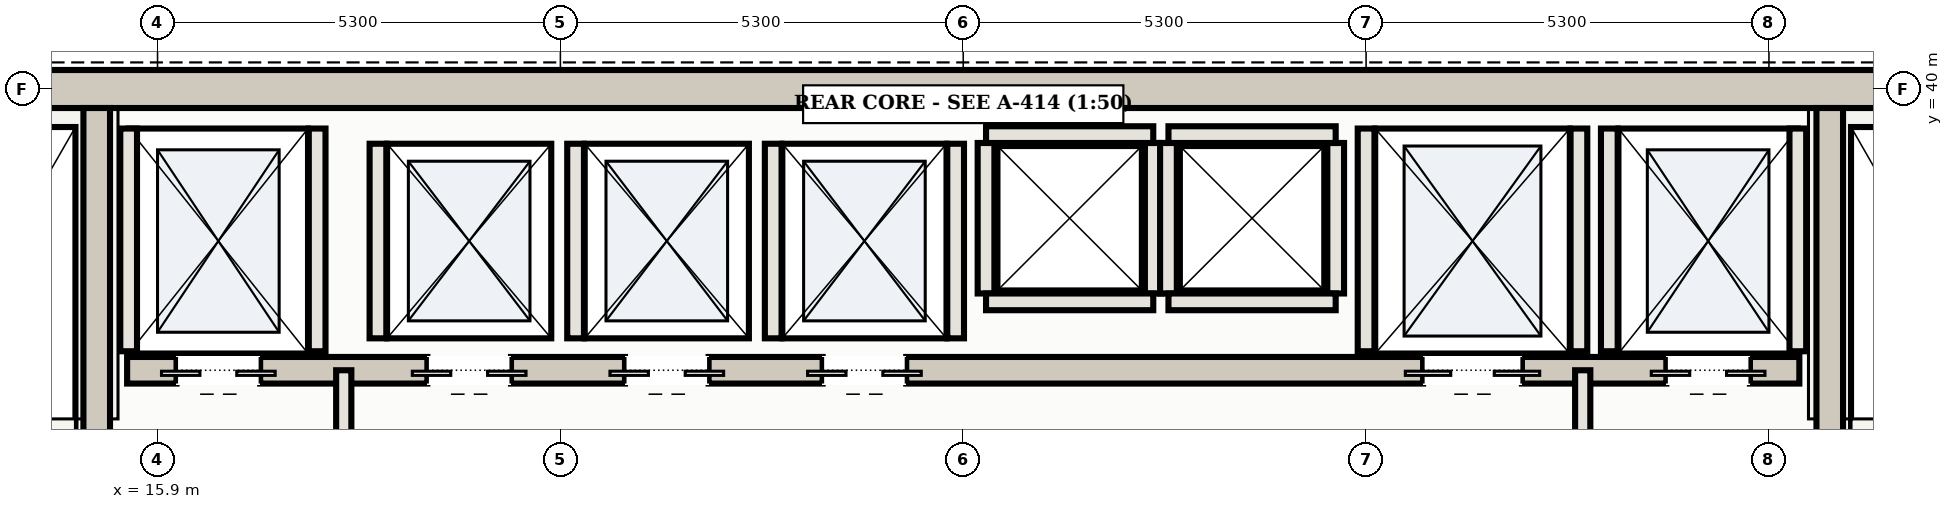
"""IFC4 building model, lengths in metres.
Left out: names, types, materials, properties, quantities, classifications, styles, units other than length and angle.
Written with IfcOpenShell. Run it as: python <this file> out.ifc"""

import sys

from ifc_helpers import new_model, si_unit, direction, frame, frame_2d, origin, place, context, subcontext, project, spatial, rectangle, extrude, element, fill, save


model = new_model("IFC4")
c1 = context("Model", 3, precision=1e-05, world=origin(), true_north=direction((0.0, 1.0)))
c2 = subcontext(c1, "Body", "Model", "MODEL_VIEW")
j1 = project(units=[si_unit("LENGTHUNIT", "METRE"), si_unit("PLANEANGLEUNIT", "RADIAN")], contexts=[c1])
p1 = place(None, origin())
s1 = spatial("IfcSite", under=j1, at=p1, CompositionType="ELEMENT")
p2 = place(p1, origin())
s2 = spatial("IfcBuilding", under=s1, at=p2, CompositionType="ELEMENT")
p3 = place(p2, frame((0.0, 0.0, 233.0)))
s3 = spatial("IfcBuildingStorey", under=s2, at=p3, CompositionType="ELEMENT", Elevation=233.0)
p4 = place(p3, frame((10.35, 40.0, 0.0), z_axis=(0.0, 0.0, 1.0), x_axis=(1.0, 0.0, 0.0)))
e1 = element("IfcWall", 1, at=p4, inside=s3, PredefinedType="SHEAR", context=c2, shape_type="SweptSolid", body=[
    extrude(rectangle(XDim=32.3, YDim=0.5, at=frame_2d((16.15, 0.0))), origin(), (0.0, 0.0, 1.0), 3.11),
])
p5 = place(p3, frame((15.1, 31.1, 0.0), z_axis=(0.0, 0.0, 1.0), x_axis=(0.0, 1.0, 0.0)))
e2 = element("IfcWall", 2, at=p5, inside=s3, PredefinedType="SHEAR", context=c2, shape_type="SweptSolid", body=[
    extrude(rectangle(XDim=8.65, YDim=0.35, at=frame_2d((4.325, 0.0))), origin(), (0.0, 0.0, 1.0), 3.11),
])
p6 = place(p5, frame((0.51, 0.0, 0.0)))
e3 = element("IfcOpeningElement", 3, at=p6, cuts=e2, PredefinedType="OPENING", context=c2, shape_type="SweptSolid", body=[
    extrude(rectangle(XDim=1.15, YDim=2.2, at=frame_2d((0.575, 1.1))), frame((0.0, 0.185, 0.0), z_axis=(0.0, -1.0, 0.0), x_axis=(1.0, 0.0, 0.0)), (0.0, 0.0, 1.0), 0.37),
])
p7 = place(p3, frame((37.9, 31.1, 0.0), z_axis=(0.0, 0.0, 1.0), x_axis=(0.0, 1.0, 0.0)))
e4 = element("IfcWall", 4, at=p7, inside=s3, PredefinedType="SHEAR", context=c2, shape_type="SweptSolid", body=[
    extrude(rectangle(XDim=8.65, YDim=0.35, at=frame_2d((4.325, 0.0))), origin(), (0.0, 0.0, 1.0), 3.11),
])
p8 = place(p7, frame((0.51, 0.0, 0.0)))
e5 = element("IfcOpeningElement", 5, at=p8, cuts=e4, PredefinedType="OPENING", context=c2, shape_type="SweptSolid", body=[
    extrude(rectangle(XDim=1.15, YDim=2.2, at=frame_2d((0.575, 1.1))), frame((0.0, 0.185, 0.0), z_axis=(0.0, -1.0, 0.0), x_axis=(1.0, 0.0, 0.0)), (0.0, 0.0, 1.0), 0.37),
])
p9 = place(p3, frame((15.5, 36.3, 0.0), z_axis=(0.0, 0.0, 1.0), x_axis=(1.0, 0.0, 0.0)))
e6 = element("IfcWall", 6, at=p9, inside=s3, PredefinedType="SHEAR", context=c2, shape_type="SweptSolid", body=[
    extrude(rectangle(XDim=22.0, YDim=0.35, at=frame_2d((11.0, 0.0))), origin(), (0.0, 0.0, 1.0), 3.11),
])
p10 = place(p9, frame((0.65, 0.0, 0.0)))
e7 = element("IfcOpeningElement", 7, at=p10, cuts=e6, PredefinedType="OPENING", context=c2, shape_type="SweptSolid", body=[
    extrude(rectangle(XDim=1.1, YDim=2.15, at=frame_2d((0.55, 1.075))), frame((0.0, 0.185, 0.0), z_axis=(0.0, -1.0, 0.0), x_axis=(1.0, 0.0, 0.0)), (0.0, 0.0, 1.0), 0.37),
])
p11 = place(p9, frame((20.25, 0.0, 0.0)))
e8 = element("IfcOpeningElement", 8, at=p11, cuts=e6, PredefinedType="OPENING", context=c2, shape_type="SweptSolid", body=[
    extrude(rectangle(XDim=1.1, YDim=2.15, at=frame_2d((0.55, 1.075))), frame((0.0, 0.185, 0.0), z_axis=(0.0, -1.0, 0.0), x_axis=(1.0, 0.0, 0.0)), (0.0, 0.0, 1.0), 0.37),
])
p12 = place(p9, frame((17.05, 0.0, 0.0)))
e9 = element("IfcOpeningElement", 9, at=p12, cuts=e6, PredefinedType="OPENING", context=c2, shape_type="SweptSolid", body=[
    extrude(rectangle(XDim=1.3, YDim=2.2, at=frame_2d((0.65, 1.1))), frame((0.0, 0.185, 0.0), z_axis=(0.0, -1.0, 0.0), x_axis=(1.0, 0.0, 0.0)), (0.0, 0.0, 1.0), 0.37),
])
p13 = place(p9, frame((3.95, 0.0, 0.0)))
e10 = element("IfcOpeningElement", 10, at=p13, cuts=e6, PredefinedType="OPENING", context=c2, shape_type="SweptSolid", body=[
    extrude(rectangle(XDim=1.1, YDim=2.15, at=frame_2d((0.55, 1.075))), frame((0.0, 0.185, 0.0), z_axis=(0.0, -1.0, 0.0), x_axis=(1.0, 0.0, 0.0)), (0.0, 0.0, 1.0), 0.37),
])
p14 = place(p9, frame((6.55, 0.0, 0.0)))
e11 = element("IfcOpeningElement", 11, at=p14, cuts=e6, PredefinedType="OPENING", context=c2, shape_type="SweptSolid", body=[
    extrude(rectangle(XDim=1.1, YDim=2.15, at=frame_2d((0.55, 1.075))), frame((0.0, 0.185, 0.0), z_axis=(0.0, -1.0, 0.0), x_axis=(1.0, 0.0, 0.0)), (0.0, 0.0, 1.0), 0.37),
])
p15 = place(p9, frame((9.15, 0.0, 0.0)))
e12 = element("IfcOpeningElement", 12, at=p15, cuts=e6, PredefinedType="OPENING", context=c2, shape_type="SweptSolid", body=[
    extrude(rectangle(XDim=1.1, YDim=2.15, at=frame_2d((0.55, 1.075))), frame((0.0, 0.185, 0.0), z_axis=(0.0, -1.0, 0.0), x_axis=(1.0, 0.0, 0.0)), (0.0, 0.0, 1.0), 0.37),
])
for number, where, z_axis, x_axis in (
    (13, (15.52, 36.55, 0.0), (0.0, 0.0, 1.0), (0.0, 1.0, 0.0)),
    (14, (18.0, 36.55, 0.0), (0.0, 0.0, 1.0), (0.0, 1.0, 0.0)),
    (15, (35.0, 36.55, 0.0), (0.0, 0.0, 1.0), (0.0, 1.0, 0.0)),
    (16, (37.48, 36.55, 0.0), (0.0, 0.0, 1.0), (0.0, 1.0, 0.0)),
    (17, (31.8, 36.55, 0.0), (0.0, 0.0, 1.0), (0.0, 1.0, 0.0)),
    (18, (34.6, 36.55, 0.0), (0.0, 0.0, 1.0), (0.0, 1.0, 0.0)),
):
    element("IfcWall", number, at=place(p3, frame(where, z_axis=z_axis, x_axis=x_axis)), inside=s3, PredefinedType="SOLIDWALL", context=c2, shape_type="SweptSolid", body=[
        extrude(rectangle(XDim=2.93, YDim=0.22, at=frame_2d((1.465, 0.0))), origin(), (0.0, 0.0, 1.0), 3.11),
    ])
for number, where, z_axis, x_axis in (
    (19, (18.8, 36.72, 0.0), (0.0, 0.0, 1.0), (0.0, 1.0, 0.0)),
    (20, (21.4, 36.72, 0.0), (0.0, 0.0, 1.0), (0.0, 1.0, 0.0)),
    (21, (24.0, 36.72, 0.0), (0.0, 0.0, 1.0), (0.0, 1.0, 0.0)),
    (22, (26.4, 36.72, 0.0), (0.0, 0.0, 1.0), (0.0, 1.0, 0.0)),
):
    element("IfcWall", number, at=place(p3, frame(where, z_axis=z_axis, x_axis=x_axis)), inside=s3, PredefinedType="SOLIDWALL", context=c2, shape_type="SweptSolid", body=[
        extrude(rectangle(XDim=2.56, YDim=0.22, at=frame_2d((1.28, 0.0))), origin(), (0.0, 0.0, 1.0), 3.11),
    ])
for number, where, z_axis, x_axis in (
    (23, (26.8, 37.31, 0.0), (0.0, 0.0, 1.0), (0.0, 1.0, 0.0)),
    (24, (29.0, 37.31, 0.0), (0.0, 0.0, 1.0), (0.0, 1.0, 0.0)),
):
    element("IfcWall", number, at=place(p3, frame(where, z_axis=z_axis, x_axis=x_axis)), inside=s3, PredefinedType="SOLIDWALL", context=c2, shape_type="SweptSolid", body=[
        extrude(rectangle(XDim=1.98, YDim=0.22, at=frame_2d((0.99, 0.0))), origin(), (0.0, 0.0, 1.0), 3.11),
    ])
for number, where, z_axis, x_axis in (
    (25, (26.8, 39.4, 0.0), (0.0, 0.0, 1.0), (1.0, 0.0, 0.0)),
    (26, (26.8, 37.2, 0.0), (0.0, 0.0, 1.0), (1.0, 0.0, 0.0)),
):
    element("IfcWall", number, at=place(p3, frame(where, z_axis=z_axis, x_axis=x_axis)), inside=s3, PredefinedType="SOLIDWALL", context=c2, shape_type="SweptSolid", body=[
        extrude(rectangle(XDim=2.2, YDim=0.22, at=frame_2d((1.1, 0.0))), origin(), (0.0, 0.0, 1.0), 3.11),
    ])
for number, where, z_axis, x_axis in (
    (27, (29.2, 37.31, 0.0), (0.0, 0.0, 1.0), (0.0, 1.0, 0.0)),
    (28, (31.4, 37.31, 0.0), (0.0, 0.0, 1.0), (0.0, 1.0, 0.0)),
):
    element("IfcWall", number, at=place(p3, frame(where, z_axis=z_axis, x_axis=x_axis)), inside=s3, PredefinedType="SOLIDWALL", context=c2, shape_type="SweptSolid", body=[
        extrude(rectangle(XDim=1.98, YDim=0.22, at=frame_2d((0.99, 0.0))), origin(), (0.0, 0.0, 1.0), 3.11),
    ])
for number, where, z_axis, x_axis in (
    (29, (29.2, 39.4, 0.0), (0.0, 0.0, 1.0), (1.0, 0.0, 0.0)),
    (30, (29.2, 37.2, 0.0), (0.0, 0.0, 1.0), (1.0, 0.0, 0.0)),
):
    element("IfcWall", number, at=place(p3, frame(where, z_axis=z_axis, x_axis=x_axis)), inside=s3, PredefinedType="SOLIDWALL", context=c2, shape_type="SweptSolid", body=[
        extrude(rectangle(XDim=2.2, YDim=0.22, at=frame_2d((1.1, 0.0))), origin(), (0.0, 0.0, 1.0), 3.11),
    ])
p16 = place(p3, frame((18.35, 31.15, 0.0), z_axis=(0.0, 0.0, 1.0), x_axis=(0.0, 1.0, 0.0)))
e31 = element("IfcWall", 31, at=p16, inside=s3, PredefinedType="PARTITIONING", context=c2, shape_type="SweptSolid", body=[
    extrude(rectangle(XDim=5.15, YDim=0.2, at=frame_2d((2.575, 0.0))), origin(), (0.0, 0.0, 1.0), 2.45),
])
p17 = place(p16, frame((1.875, 0.0, 0.0)))
e32 = element("IfcOpeningElement", 32, at=p17, cuts=e31, PredefinedType="OPENING", context=c2, shape_type="SweptSolid", body=[
    extrude(rectangle(XDim=1.25, YDim=2.2, at=frame_2d((0.625, 1.1))), frame((0.0, 0.11, 0.0), z_axis=(0.0, -1.0, 0.0), x_axis=(1.0, 0.0, 0.0)), (0.0, 0.0, 1.0), 0.22),
])
p18 = place(p3, frame((34.65, 31.15, 0.0), z_axis=(0.0, 0.0, 1.0), x_axis=(0.0, 1.0, 0.0)))
e33 = element("IfcWall", 33, at=p18, inside=s3, PredefinedType="PARTITIONING", context=c2, shape_type="SweptSolid", body=[
    extrude(rectangle(XDim=5.15, YDim=0.2, at=frame_2d((2.575, 0.0))), origin(), (0.0, 0.0, 1.0), 2.45),
])
p19 = place(p18, frame((1.875, 0.0, 0.0)))
e34 = element("IfcOpeningElement", 34, at=p19, cuts=e33, PredefinedType="OPENING", context=c2, shape_type="SweptSolid", body=[
    extrude(rectangle(XDim=1.25, YDim=2.2, at=frame_2d((0.625, 1.1))), frame((0.0, 0.11, 0.0), z_axis=(0.0, -1.0, 0.0), x_axis=(1.0, 0.0, 0.0)), (0.0, 0.0, 1.0), 0.22),
])
p20 = place(p10, frame((1.1, 0.0, 0.0), z_axis=(0.0, 0.0, 1.0), x_axis=(-1.0, 0.0, 0.0)))
e35 = element("IfcDoor", 35, at=p20, inside=s3, OperationType="DOUBLE_DOOR_SLIDING", PredefinedType="DOOR", context=c2, shape_type="SweptSolid", body=[
    extrude(rectangle(XDim=1.1, YDim=2.15, at=frame_2d((0.55, 1.075))), frame((0.0, 0.025, 0.0), z_axis=(0.0, -1.0, 0.0), x_axis=(1.0, 0.0, 0.0)), (0.0, 0.0, 1.0), 0.05),
])
fill(e7, e35)
p21 = place(p11, frame((1.1, 0.0, 0.0), z_axis=(0.0, 0.0, 1.0), x_axis=(-1.0, 0.0, 0.0)))
e36 = element("IfcDoor", 36, at=p21, inside=s3, OperationType="DOUBLE_DOOR_SLIDING", PredefinedType="DOOR", context=c2, shape_type="SweptSolid", body=[
    extrude(rectangle(XDim=1.1, YDim=2.15, at=frame_2d((0.55, 1.075))), frame((0.0, 0.025, 0.0), z_axis=(0.0, -1.0, 0.0), x_axis=(1.0, 0.0, 0.0)), (0.0, 0.0, 1.0), 0.05),
])
fill(e8, e36)
p22 = place(p12, frame((1.3, 0.0, 0.0), z_axis=(0.0, 0.0, 1.0), x_axis=(-1.0, 0.0, 0.0)))
e37 = element("IfcDoor", 37, at=p22, inside=s3, OperationType="DOUBLE_DOOR_SLIDING", PredefinedType="DOOR", context=c2, shape_type="SweptSolid", body=[
    extrude(rectangle(XDim=1.3, YDim=2.2, at=frame_2d((0.65, 1.1))), frame((0.0, 0.025, 0.0), z_axis=(0.0, -1.0, 0.0), x_axis=(1.0, 0.0, 0.0)), (0.0, 0.0, 1.0), 0.05),
])
fill(e9, e37)
p23 = place(p13, frame((1.1, 0.0, 0.0), z_axis=(0.0, 0.0, 1.0), x_axis=(-1.0, 0.0, 0.0)))
e38 = element("IfcDoor", 38, at=p23, inside=s3, OperationType="DOUBLE_DOOR_SLIDING", PredefinedType="DOOR", context=c2, shape_type="SweptSolid", body=[
    extrude(rectangle(XDim=1.1, YDim=2.15, at=frame_2d((0.55, 1.075))), frame((0.0, 0.025, 0.0), z_axis=(0.0, -1.0, 0.0), x_axis=(1.0, 0.0, 0.0)), (0.0, 0.0, 1.0), 0.05),
])
fill(e10, e38)
p24 = place(p14, frame((1.1, 0.0, 0.0), z_axis=(0.0, 0.0, 1.0), x_axis=(-1.0, 0.0, 0.0)))
e39 = element("IfcDoor", 39, at=p24, inside=s3, OperationType="DOUBLE_DOOR_SLIDING", PredefinedType="DOOR", context=c2, shape_type="SweptSolid", body=[
    extrude(rectangle(XDim=1.1, YDim=2.15, at=frame_2d((0.55, 1.075))), frame((0.0, 0.025, 0.0), z_axis=(0.0, -1.0, 0.0), x_axis=(1.0, 0.0, 0.0)), (0.0, 0.0, 1.0), 0.05),
])
fill(e11, e39)
p25 = place(p15, frame((1.1, 0.0, 0.0), z_axis=(0.0, 0.0, 1.0), x_axis=(-1.0, 0.0, 0.0)))
e40 = element("IfcDoor", 40, at=p25, inside=s3, OperationType="DOUBLE_DOOR_SLIDING", PredefinedType="DOOR", context=c2, shape_type="SweptSolid", body=[
    extrude(rectangle(XDim=1.1, YDim=2.15, at=frame_2d((0.55, 1.075))), frame((0.0, 0.025, 0.0), z_axis=(0.0, -1.0, 0.0), x_axis=(1.0, 0.0, 0.0)), (0.0, 0.0, 1.0), 0.05),
])
fill(e12, e40)
save(model, sys.argv[1])
